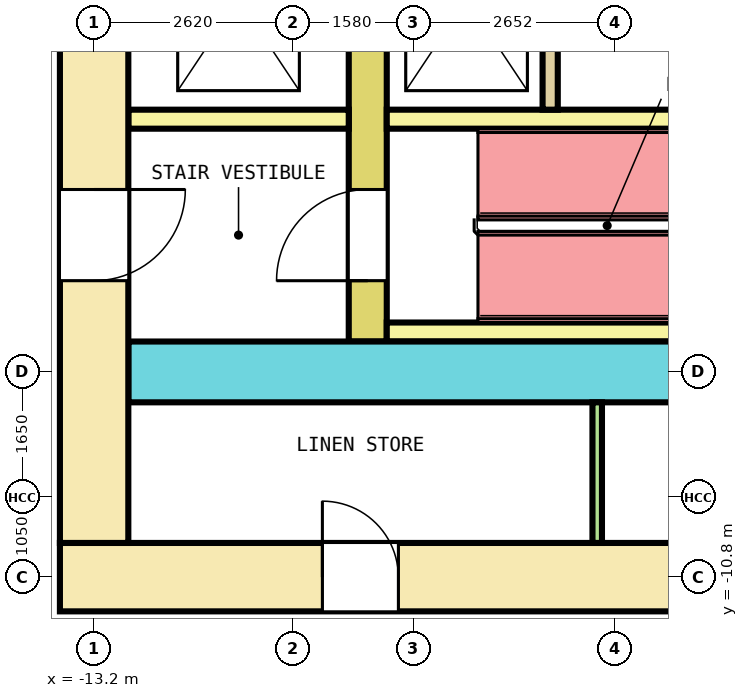
"""IFC4 building model, lengths in metres.
Left out: names, types, materials, properties, quantities, classifications, styles, units other than length and angle.
Written with IfcOpenShell. Run it as: python <this file> out.ifc"""

import sys

from ifc_helpers import new_model, si_unit, direction, frame, frame_2d, origin, place, context, subcontext, project, spatial, rectangle, extrude, element, fill, save


model = new_model("IFC4")
c1 = context("Model", 3, precision=1e-05, world=origin(), true_north=direction((0.0, 1.0)))
c2 = subcontext(c1, "Body", "Model", "MODEL_VIEW")
j1 = project(units=[si_unit("LENGTHUNIT", "METRE"), si_unit("PLANEANGLEUNIT", "RADIAN")], contexts=[c1])
p1 = place(None, origin())
s1 = spatial("IfcSite", under=j1, at=p1, CompositionType="ELEMENT")
p2 = place(p1, origin())
s2 = spatial("IfcBuilding", under=s1, at=p2, CompositionType="ELEMENT")
p3 = place(p2, frame((0.0, 0.0, 27.8)))
s3 = spatial("IfcBuildingStorey", under=s2, at=p3, CompositionType="ELEMENT", Elevation=27.8)
p4 = place(p3, frame((-13.65, -10.8, 0.0), z_axis=(0.0, 0.0, 1.0), x_axis=(1.0, 0.0, 0.0)))
e1 = element("IfcWall", 1, at=p4, inside=s3, PredefinedType="SHEAR", context=c2, shape_type="SweptSolid", body=[
    extrude(rectangle(XDim=27.3, YDim=0.9, at=frame_2d((13.65, 0.0))), origin(), (0.0, 0.0, 1.0), 4.1),
])
p5 = place(p4, frame((3.453, 0.0, 0.0)))
e2 = element("IfcOpeningElement", 2, at=p5, cuts=e1, PredefinedType="OPENING", context=c2, shape_type="SweptSolid", body=[
    extrude(rectangle(XDim=1.0, YDim=2.1, at=frame_2d((0.5, 1.05))), frame((0.0, 0.46, 0.0), z_axis=(0.0, -1.0, 0.0), x_axis=(1.0, 0.0, 0.0)), (0.0, 0.0, 1.0), 0.92),
])
p6 = place(p4, frame((9.653, 0.0, 0.0)))
e3 = element("IfcOpeningElement", 3, at=p6, cuts=e1, PredefinedType="OPENING", context=c2, shape_type="SweptSolid", body=[
    extrude(rectangle(XDim=1.0, YDim=2.1, at=frame_2d((0.5, 1.05))), frame((0.0, 0.46, 0.0), z_axis=(0.0, -1.0, 0.0), x_axis=(1.0, 0.0, 0.0)), (0.0, 0.0, 1.0), 0.92),
])
p7 = place(p4, frame((19.872, 0.0, 0.0)))
e4 = element("IfcOpeningElement", 4, at=p7, cuts=e1, PredefinedType="OPENING", context=c2, shape_type="SweptSolid", body=[
    extrude(rectangle(XDim=1.0, YDim=2.1, at=frame_2d((0.5, 1.05))), frame((0.0, 0.46, 0.0), z_axis=(0.0, -1.0, 0.0), x_axis=(1.0, 0.0, 0.0)), (0.0, 0.0, 1.0), 0.92),
])
p8 = place(p4, frame((23.922, 0.0, 0.0)))
e5 = element("IfcOpeningElement", 5, at=p8, cuts=e1, PredefinedType="OPENING", context=c2, shape_type="SweptSolid", body=[
    extrude(rectangle(XDim=1.0, YDim=2.1, at=frame_2d((0.5, 1.05))), frame((0.0, 0.46, 0.0), z_axis=(0.0, -1.0, 0.0), x_axis=(1.0, 0.0, 0.0)), (0.0, 0.0, 1.0), 0.92),
])
p9 = place(p4, frame((15.2, 0.0, 0.0)))
e6 = element("IfcOpeningElement", 6, at=p9, cuts=e1, PredefinedType="OPENING", context=c2, shape_type="SweptSolid", body=[
    extrude(rectangle(XDim=1.2, YDim=2.1, at=frame_2d((0.6, 1.05))), frame((0.0, 0.46, 0.0), z_axis=(0.0, -1.0, 0.0), x_axis=(1.0, 0.0, 0.0)), (0.0, 0.0, 1.0), 0.92),
])
p10 = place(p3, frame((-13.2, -10.35, 0.0), z_axis=(0.0, 0.0, 1.0), x_axis=(0.0, 1.0, 0.0)))
e7 = element("IfcWall", 7, at=p10, inside=s3, PredefinedType="SHEAR", context=c2, shape_type="SweptSolid", body=[
    extrude(rectangle(XDim=20.7, YDim=0.9, at=frame_2d((10.35, 0.0))), origin(), (0.0, 0.0, 1.0), 4.1),
])
p11 = place(p10, frame((9.15, 0.0, 0.0)))
e8 = element("IfcOpeningElement", 8, at=p11, cuts=e7, PredefinedType="OPENING", context=c2, shape_type="SweptSolid", body=[
    extrude(rectangle(XDim=2.4, YDim=2.1, at=frame_2d((1.2, 1.05))), frame((0.0, 0.46, 0.0), z_axis=(0.0, -1.0, 0.0), x_axis=(1.0, 0.0, 0.0)), (0.0, 0.0, 1.0), 0.92),
])
p12 = place(p10, frame((16.05, 0.0, 0.0)))
e9 = element("IfcOpeningElement", 9, at=p12, cuts=e7, PredefinedType="OPENING", context=c2, shape_type="SweptSolid", body=[
    extrude(rectangle(XDim=1.2, YDim=2.1, at=frame_2d((0.6, 1.05))), frame((0.0, 0.46, 0.0), z_axis=(0.0, -1.0, 0.0), x_axis=(1.0, 0.0, 0.0)), (0.0, 0.0, 1.0), 0.92),
])
p13 = place(p10, frame((3.45, 0.0, 0.0)))
e10 = element("IfcOpeningElement", 10, at=p13, cuts=e7, PredefinedType="OPENING", context=c2, shape_type="SweptSolid", body=[
    extrude(rectangle(XDim=1.2, YDim=2.1, at=frame_2d((0.6, 1.05))), frame((0.0, 0.46, 0.0), z_axis=(0.0, -1.0, 0.0), x_axis=(1.0, 0.0, 0.0)), (0.0, 0.0, 1.0), 0.92),
])
p14 = place(p3, frame((-12.75, -8.1, 0.0), z_axis=(0.0, 0.0, 1.0), x_axis=(1.0, 0.0, 0.0)))
e11 = element("IfcWall", 11, at=p14, inside=s3, PredefinedType="SHEAR", context=c2, shape_type="SweptSolid", body=[
    extrude(rectangle(XDim=25.5, YDim=0.8, at=frame_2d((12.75, 0.0))), origin(), (0.0, 0.0, 1.0), 4.1),
])
p15 = place(p14, frame((14.3, 0.0, 0.0)))
e12 = element("IfcOpeningElement", 12, at=p15, cuts=e11, PredefinedType="OPENING", context=c2, shape_type="SweptSolid", body=[
    extrude(rectangle(XDim=1.2, YDim=2.1, at=frame_2d((0.6, 1.05))), frame((0.0, 0.41, 0.0), z_axis=(0.0, -1.0, 0.0), x_axis=(1.0, 0.0, 0.0)), (0.0, 0.0, 1.0), 0.82),
])
p16 = place(p3, frame((-9.6, -7.7, 0.0), z_axis=(0.0, 0.0, 1.0), x_axis=(0.0, 1.0, 0.0)))
e13 = element("IfcWall", 13, at=p16, inside=s3, PredefinedType="SHEAR", context=c2, shape_type="SweptSolid", body=[
    extrude(rectangle(XDim=15.4, YDim=0.5, at=frame_2d((7.7, 0.0))), origin(), (0.0, 0.0, 1.0), 4.1),
])
p17 = place(p16, frame((6.5, 0.0, 0.0)))
e14 = element("IfcOpeningElement", 14, at=p17, cuts=e13, PredefinedType="OPENING", context=c2, shape_type="SweptSolid", body=[
    extrude(rectangle(XDim=2.4, YDim=2.1, at=frame_2d((1.2, 1.05))), frame((0.0, 0.26, 0.0), z_axis=(0.0, -1.0, 0.0), x_axis=(1.0, 0.0, 0.0)), (0.0, 0.0, 1.0), 0.52),
])
p18 = place(p16, frame((13.4, 0.0, 0.0)))
e15 = element("IfcOpeningElement", 15, at=p18, cuts=e13, PredefinedType="OPENING", context=c2, shape_type="SweptSolid", body=[
    extrude(rectangle(XDim=1.2, YDim=2.1, at=frame_2d((0.6, 1.05))), frame((0.0, 0.26, 0.0), z_axis=(0.0, -1.0, 0.0), x_axis=(1.0, 0.0, 0.0)), (0.0, 0.0, 1.0), 0.52),
])
p19 = place(p16, frame((0.8, 0.0, 0.0)))
e16 = element("IfcOpeningElement", 16, at=p19, cuts=e13, PredefinedType="OPENING", context=c2, shape_type="SweptSolid", body=[
    extrude(rectangle(XDim=1.2, YDim=2.1, at=frame_2d((0.6, 1.05))), frame((0.0, 0.26, 0.0), z_axis=(0.0, -1.0, 0.0), x_axis=(1.0, 0.0, 0.0)), (0.0, 0.0, 1.0), 0.52),
])
p20 = place(p3, frame((-12.75, -4.775, 0.0), z_axis=(0.0, 0.0, 1.0), x_axis=(1.0, 0.0, 0.0)))
e17 = element("IfcWall", 17, at=p20, inside=s3, PredefinedType="SOLIDWALL", context=c2, shape_type="SweptSolid", body=[
    extrude(rectangle(XDim=2.9, YDim=0.25, at=frame_2d((1.45, 0.0))), origin(), (0.0, 0.0, 1.0), 4.1),
])
p21 = place(p3, frame((-9.35, -4.775, 0.0), z_axis=(0.0, 0.0, 1.0), x_axis=(1.0, 0.0, 0.0)))
e18 = element("IfcWall", 18, at=p21, inside=s3, PredefinedType="SOLIDWALL", context=c2, shape_type="SweptSolid", body=[
    extrude(rectangle(XDim=18.7, YDim=0.25, at=frame_2d((9.35, 0.0))), origin(), (0.0, 0.0, 1.0), 4.1),
])
p22 = place(p3, frame((-7.2, -4.65, 0.0), z_axis=(0.0, 0.0, 1.0), x_axis=(0.0, 1.0, 0.0)))
e19 = element("IfcWall", 19, at=p22, inside=s3, PredefinedType="SOLIDWALL", context=c2, shape_type="SweptSolid", body=[
    extrude(rectangle(XDim=2.9, YDim=0.2, at=frame_2d((1.45, 0.0))), origin(), (0.0, 0.0, 1.0), 4.1),
])
p23 = place(p3, frame((-9.35, -7.575, 0.0), z_axis=(0.0, 0.0, 1.0), x_axis=(1.0, 0.0, 0.0)))
e20 = element("IfcWall", 20, at=p23, inside=s3, PredefinedType="SOLIDWALL", context=c2, shape_type="SweptSolid", body=[
    extrude(rectangle(XDim=5.8, YDim=0.25, at=frame_2d((2.9, 0.0))), origin(), (0.0, 0.0, 1.0), 4.1),
])
p24 = place(p3, frame((-6.581, -10.35, 0.0), z_axis=(0.0, 0.0, 1.0), x_axis=(0.0, 1.0, 0.0)))
e21 = element("IfcWall", 21, at=p24, inside=s3, PredefinedType="PARTITIONING", context=c2, shape_type="SweptSolid", body=[
    extrude(rectangle(XDim=1.85, YDim=0.125, at=frame_2d((0.925, 0.0))), origin(), (0.0, 0.0, 1.0), 4.1),
])
p25 = place(p19, origin())
e22 = element("IfcDoor", 22, at=p25, inside=s3, OperationType="SINGLE_SWING_RIGHT", PredefinedType="DOOR", context=c2, shape_type="SweptSolid", body=[
    extrude(rectangle(XDim=1.2, YDim=2.1, at=frame_2d((0.6, 1.05))), frame((0.0, 0.2, 0.0), z_axis=(0.0, -1.0, 0.0), x_axis=(1.0, 0.0, 0.0)), (0.0, 0.0, 1.0), 0.4),
])
fill(e16, e22)
p26 = place(p13, origin())
e23 = element("IfcDoor", 23, at=p26, inside=s3, OperationType="SINGLE_SWING_LEFT", PredefinedType="DOOR", context=c2, shape_type="SweptSolid", body=[
    extrude(rectangle(XDim=1.2, YDim=2.1, at=frame_2d((0.6, 1.05))), frame((0.0, 0.3, 0.0), z_axis=(0.0, -1.0, 0.0), x_axis=(1.0, 0.0, 0.0)), (0.0, 0.0, 1.0), 0.6),
])
fill(e10, e23)
p27 = place(p5, origin())
e24 = element("IfcDoor", 24, at=p27, inside=s3, OperationType="SINGLE_SWING_LEFT", PredefinedType="DOOR", context=c2, shape_type="SweptSolid", body=[
    extrude(rectangle(XDim=1.0, YDim=2.1, at=frame_2d((0.5, 1.05))), frame((0.0, 0.3, 0.0), z_axis=(0.0, -1.0, 0.0), x_axis=(1.0, 0.0, 0.0)), (0.0, 0.0, 1.0), 0.6),
])
fill(e2, e24)
save(model, sys.argv[1])
